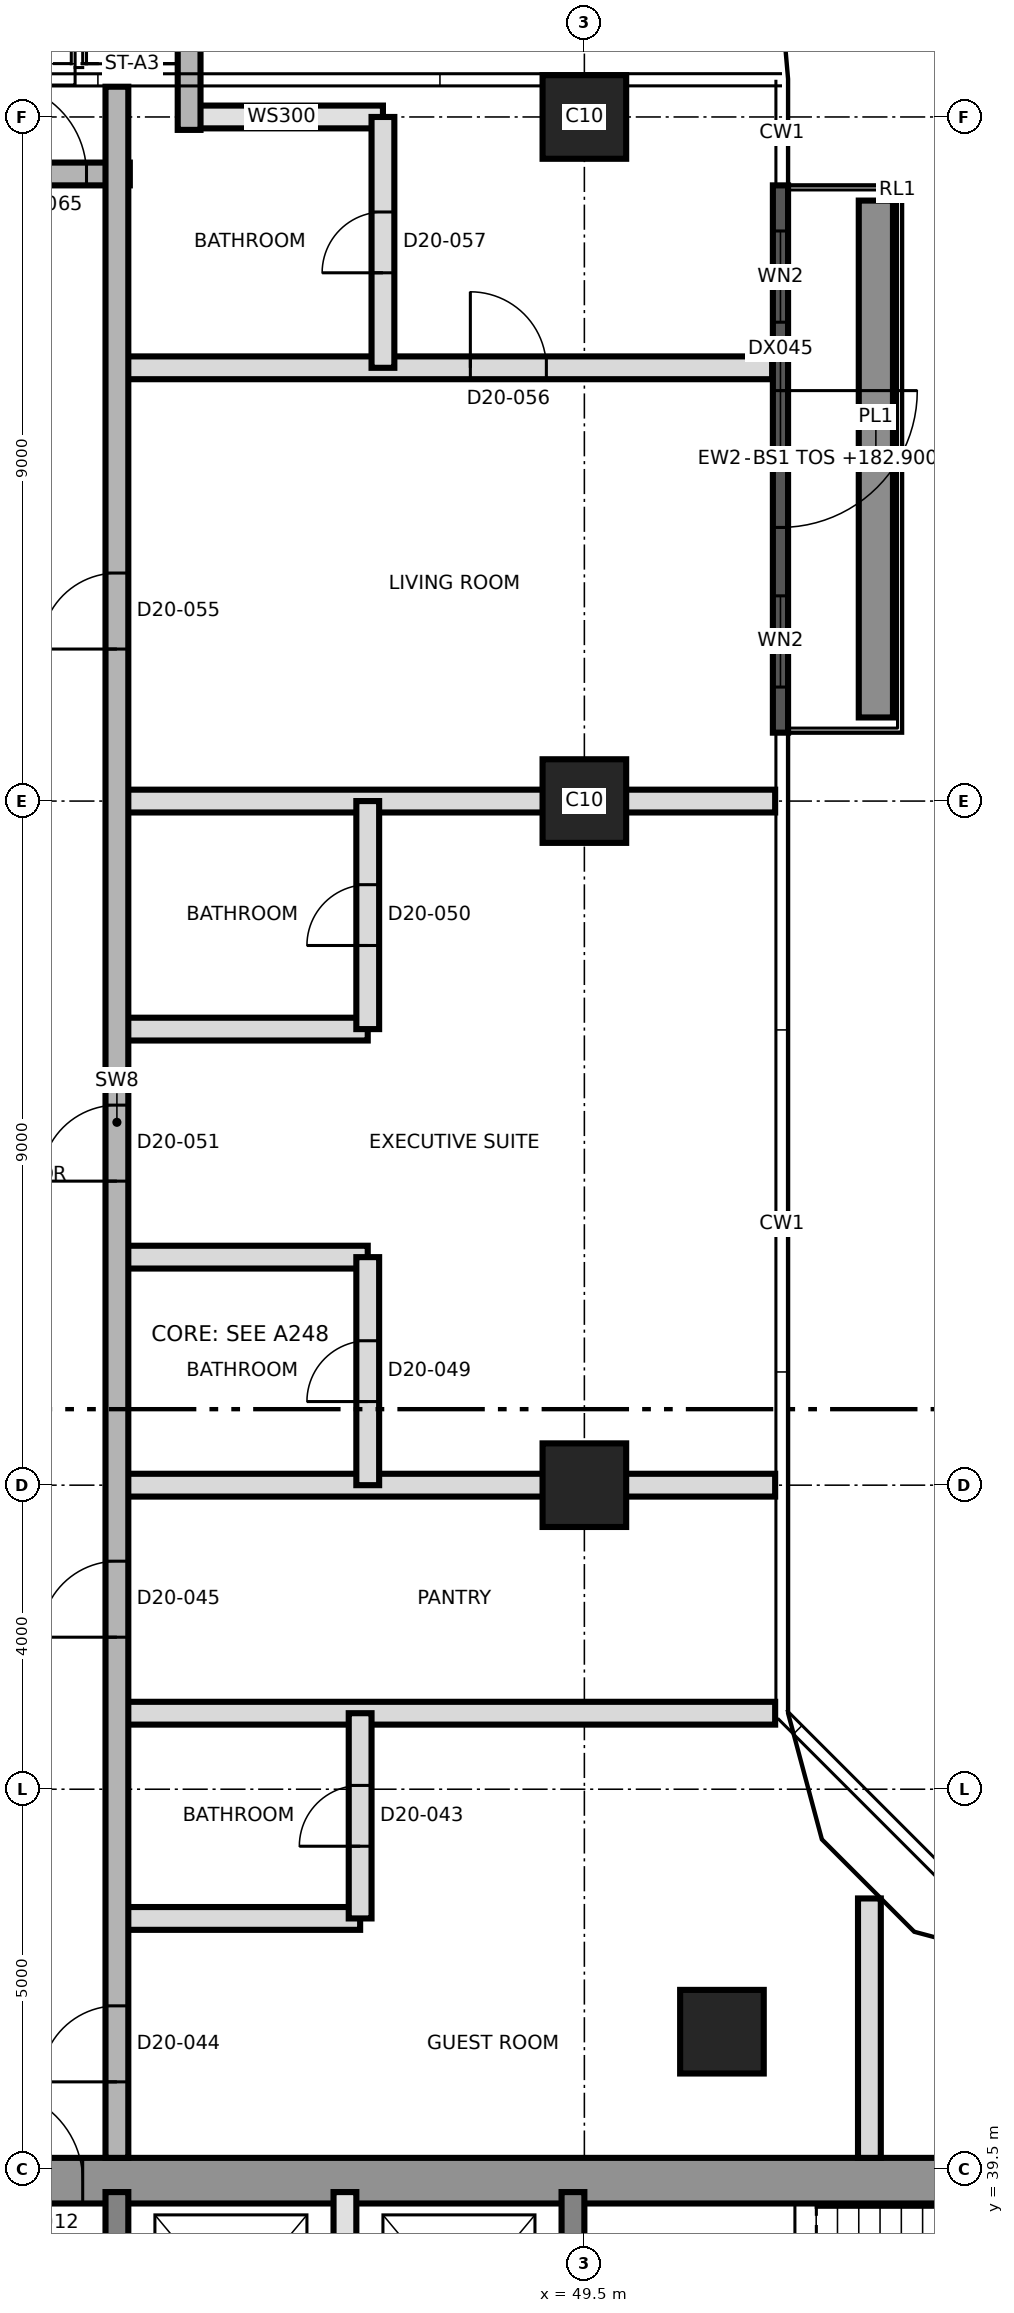
"""IFC4 building model, lengths in metres.
Left out: names, types, materials, properties, quantities, classifications, styles, units other than length and angle.
Written with IfcOpenShell. Run it as: python <this file> out.ifc"""

import sys

from ifc_helpers import new_model, si_unit, direction, frame, frame_2d, origin, origin_2d, place, context, subcontext, project, spatial, rectangle, extrude, element, fill, save


model = new_model("IFC4")
c1 = context("Model", 3, precision=1e-05, world=origin(), true_north=direction((0.0, 1.0)))
c2 = subcontext(c1, "Body", "Model", "MODEL_VIEW")
j1 = project(units=[si_unit("LENGTHUNIT", "METRE"), si_unit("PLANEANGLEUNIT", "RADIAN")], contexts=[c1])
p1 = place(None, origin())
s1 = spatial("IfcSite", under=j1, at=p1, CompositionType="ELEMENT")
p2 = place(p1, origin())
s2 = spatial("IfcBuilding", under=s1, at=p2, CompositionType="ELEMENT")
p3 = place(p2, frame((0.0, 0.0, 182.9)))
s3 = spatial("IfcBuildingStorey", under=s2, at=p3, CompositionType="ELEMENT", Elevation=182.9)
p4 = place(p3, frame((31.2, 39.35, 0.0), z_axis=(0.0, 0.0, 1.0), x_axis=(1.0, 0.0, 0.0)))
e1 = element("IfcWall", 1, at=p4, inside=s3, PredefinedType="SHEAR", context=c2, shape_type="SweptSolid", body=[
    extrude(rectangle(XDim=27.0, YDim=0.6, at=frame_2d((13.5, 0.0))), origin(), (0.0, 0.0, 1.0), 3.7),
])
p5 = place(p4, frame((10.5, 0.0, 0.0)))
e2 = element("IfcOpeningElement", 2, at=p5, cuts=e1, PredefinedType="OPENING", context=c2, shape_type="SweptSolid", body=[
    extrude(rectangle(XDim=1.2, YDim=2.1, at=frame_2d((0.6, 1.05))), frame((0.0, 0.31, 0.0), z_axis=(0.0, -1.0, 0.0), x_axis=(1.0, 0.0, 0.0)), (0.0, 0.0, 1.0), 0.62),
])
for number, where, z_axis, x_axis in (
    (3, (43.35, 33.5, 0.0), (0.0, 0.0, 1.0), (0.0, 1.0, 0.0)),
    (4, (49.35, 33.5, 0.0), (0.0, 0.0, 1.0), (0.0, 1.0, 0.0)),
):
    element("IfcWall", number, at=place(p3, frame(where, z_axis=z_axis, x_axis=x_axis)), inside=s3, PredefinedType="SHEAR", context=c2, shape_type="SweptSolid", body=[
        extrude(rectangle(XDim=5.7, YDim=0.3, at=frame_2d((2.85, 0.0))), origin(), (0.0, 0.0, 1.0), 3.7),
    ])
for number, where, z_axis, x_axis in (
    (5, (51.31, 41.31, 0.0), (0.0, 0.0, 1.0), (1.0, 0.0, 0.0)),
    (6, (49.5, 48.5, 0.0), (0.0, 0.0, 1.0), (1.0, 0.0, 0.0)),
    (7, (49.5, 57.5, 0.0), (0.0, 0.0, 1.0), (1.0, 0.0, 0.0)),
    (8, (49.5, 66.5, 0.0), (0.0, 0.0, 1.0), (1.0, 0.0, 0.0)),
):
    element("IfcColumn", number, at=place(p3, frame(where, z_axis=z_axis, x_axis=x_axis)), inside=s3, PredefinedType="COLUMN", context=c2, shape_type="SweptSolid", body=[
        extrude(rectangle(XDim=1.1, YDim=1.1, at=origin_2d()), origin(), (0.0, 0.0, 1.0), 3.7),
    ])
p6 = place(p3, frame((53.335, 62.0, 0.0), z_axis=(0.0, 0.0, 1.0), x_axis=(1.0, 0.0, 0.0)))
e9 = element("IfcWall", 9, at=p6, inside=s3, PredefinedType="SOLIDWALL", context=c2, shape_type="SweptSolid", body=[
    extrude(rectangle(XDim=0.45, YDim=6.8, at=origin_2d()), origin(), (0.0, 0.0, 1.0), 1.0),
])
p7 = place(p3, frame((52.08, 65.6, 0.0), z_axis=(0.0, 0.0, 1.0), x_axis=(0.0, -1.0, 0.0)))
e10 = element("IfcWall", 10, at=p7, inside=s3, PredefinedType="SOLIDWALL", context=c2, shape_type="SweptSolid", body=[
    extrude(rectangle(XDim=7.2, YDim=0.2, at=frame_2d((3.6, 0.0))), origin(), (0.0, 0.0, 1.0), 3.4),
])
p8 = place(p7, frame((2.7, 0.0, 0.0)))
e11 = element("IfcOpeningElement", 11, at=p8, cuts=e10, PredefinedType="OPENING", context=c2, shape_type="SweptSolid", body=[
    extrude(rectangle(XDim=1.8, YDim=2.4, at=frame_2d((0.9, 1.2))), frame((0.0, 0.11, 0.0), z_axis=(0.0, -1.0, 0.0), x_axis=(1.0, 0.0, 0.0)), (0.0, 0.0, 1.0), 0.22),
])
p9 = place(p7, frame((5.4, 0.0, 0.9)))
e12 = element("IfcOpeningElement", 12, at=p9, cuts=e10, PredefinedType="OPENING", context=c2, shape_type="SweptSolid", body=[
    extrude(rectangle(XDim=1.2, YDim=2.1, at=frame_2d((0.6, 1.05))), frame((0.0, 0.11, 0.0), z_axis=(0.0, -1.0, 0.0), x_axis=(1.0, 0.0, 0.0)), (0.0, 0.0, 1.0), 0.22),
])
p10 = place(p7, frame((0.6, 0.0, 0.9)))
e13 = element("IfcOpeningElement", 13, at=p10, cuts=e10, PredefinedType="OPENING", context=c2, shape_type="SweptSolid", body=[
    extrude(rectangle(XDim=1.2, YDim=2.1, at=frame_2d((0.6, 1.05))), frame((0.0, 0.11, 0.0), z_axis=(0.0, -1.0, 0.0), x_axis=(1.0, 0.0, 0.0)), (0.0, 0.0, 1.0), 0.22),
])
p11 = place(p3, frame((46.35, 36.2, 0.0), z_axis=(0.0, 0.0, 1.0), x_axis=(0.0, 1.0, 0.0)))
e14 = element("IfcWall", 14, at=p11, inside=s3, PredefinedType="SOLIDWALL", context=c2, shape_type="SweptSolid", body=[
    extrude(rectangle(XDim=3.0, YDim=0.3, at=frame_2d((1.5, 0.0))), origin(), (0.0, 0.0, 1.0), 3.4),
])
p12 = place(p3, frame((43.35, 42.8, 0.0), z_axis=(0.0, 0.0, 1.0), x_axis=(1.0, 0.0, 0.0)))
e15 = element("IfcWall", 15, at=p12, inside=s3, PredefinedType="PARTITIONING", context=c2, shape_type="SweptSolid", body=[
    extrude(rectangle(XDim=3.2, YDim=0.3, at=frame_2d((1.6, 0.0))), origin(), (0.0, 0.0, 1.0), 3.4),
])
for number, where, z_axis, x_axis in (
    (16, (43.35, 45.5, 0.0), (0.0, 0.0, 1.0), (1.0, 0.0, 0.0)),
    (17, (43.35, 48.5, 0.0), (0.0, 0.0, 1.0), (1.0, 0.0, 0.0)),
):
    element("IfcWall", number, at=place(p3, frame(where, z_axis=z_axis, x_axis=x_axis)), inside=s3, PredefinedType="PARTITIONING", context=c2, shape_type="SweptSolid", body=[
        extrude(rectangle(XDim=8.66, YDim=0.3, at=frame_2d((4.33, 0.0))), origin(), (0.0, 0.0, 1.0), 3.4),
    ])
for number, where, z_axis, x_axis in (
    (18, (43.35, 51.5, 0.0), (0.0, 0.0, 1.0), (1.0, 0.0, 0.0)),
    (19, (43.35, 54.5, 0.0), (0.0, 0.0, 1.0), (1.0, 0.0, 0.0)),
):
    element("IfcWall", number, at=place(p3, frame(where, z_axis=z_axis, x_axis=x_axis)), inside=s3, PredefinedType="PARTITIONING", context=c2, shape_type="SweptSolid", body=[
        extrude(rectangle(XDim=3.3, YDim=0.3, at=frame_2d((1.65, 0.0))), origin(), (0.0, 0.0, 1.0), 3.4),
    ])
p13 = place(p3, frame((43.35, 57.5, 0.0), z_axis=(0.0, 0.0, 1.0), x_axis=(1.0, 0.0, 0.0)))
e20 = element("IfcWall", 20, at=p13, inside=s3, PredefinedType="PARTITIONING", context=c2, shape_type="SweptSolid", body=[
    extrude(rectangle(XDim=8.66, YDim=0.3, at=frame_2d((4.33, 0.0))), origin(), (0.0, 0.0, 1.0), 3.4),
])
p14 = place(p3, frame((43.35, 63.2, 0.0), z_axis=(0.0, 0.0, 1.0), x_axis=(1.0, 0.0, 0.0)))
e21 = element("IfcWall", 21, at=p14, inside=s3, PredefinedType="PARTITIONING", context=c2, shape_type="SweptSolid", body=[
    extrude(rectangle(XDim=8.62, YDim=0.3, at=frame_2d((4.31, 0.0))), origin(), (0.0, 0.0, 1.0), 3.4),
])
p15 = place(p14, frame((4.65, 0.0, 0.0)))
e22 = element("IfcOpeningElement", 22, at=p15, cuts=e21, PredefinedType="OPENING", context=c2, shape_type="SweptSolid", body=[
    extrude(rectangle(XDim=1.0, YDim=2.1, at=frame_2d((0.5, 1.05))), frame((0.0, 0.16, 0.0), z_axis=(0.0, -1.0, 0.0), x_axis=(1.0, 0.0, 0.0)), (0.0, 0.0, 1.0), 0.32),
])
p16 = place(p3, frame((40.65, 65.75, 0.0), z_axis=(0.0, 0.0, 1.0), x_axis=(1.0, 0.0, 0.0)))
e23 = element("IfcWall", 23, at=p16, inside=s3, PredefinedType="SHEAR", context=c2, shape_type="SweptSolid", body=[
    extrude(rectangle(XDim=2.87, YDim=0.3, at=frame_2d((1.435, 0.0))), origin(), (0.0, 0.0, 1.0), 3.4),
])
p17 = place(p16, frame((1.1, 0.0, 0.0)))
e24 = element("IfcOpeningElement", 24, at=p17, cuts=e23, PredefinedType="OPENING", context=c2, shape_type="SweptSolid", body=[
    extrude(rectangle(XDim=1.2, YDim=2.1, at=frame_2d((0.6, 1.05))), frame((0.0, 0.16, 0.0), z_axis=(0.0, -1.0, 0.0), x_axis=(1.0, 0.0, 0.0)), (0.0, 0.0, 1.0), 0.32),
])
p18 = place(p3, frame((44.18, 66.5, 0.0), z_axis=(0.0, 0.0, 1.0), x_axis=(1.0, 0.0, 0.0)))
e25 = element("IfcWall", 25, at=p18, inside=s3, PredefinedType="SOLIDWALL", context=c2, shape_type="SweptSolid", body=[
    extrude(rectangle(XDim=2.67, YDim=0.3, at=frame_2d((1.335, 0.0))), origin(), (0.0, 0.0, 1.0), 3.4),
])
p19 = place(p3, frame((43.35, 39.65, 0.0), z_axis=(0.0, 0.0, 1.0), x_axis=(0.0, 1.0, 0.0)))
e26 = element("IfcWall", 26, at=p19, inside=s3, PredefinedType="SHEAR", context=c2, shape_type="SweptSolid", body=[
    extrude(rectangle(XDim=27.248, YDim=0.3, at=frame_2d((13.624, 0.0))), origin(), (0.0, 0.0, 1.0), 3.4),
])
p20 = place(p19, frame((1.0, 0.0, 0.0)))
e27 = element("IfcOpeningElement", 27, at=p20, cuts=e26, PredefinedType="OPENING", context=c2, shape_type="SweptSolid", body=[
    extrude(rectangle(XDim=1.0, YDim=2.1, at=frame_2d((0.5, 1.05))), frame((0.0, 0.16, 0.0), z_axis=(0.0, -1.0, 0.0), x_axis=(1.0, 0.0, 0.0)), (0.0, 0.0, 1.0), 0.32),
])
p21 = place(p19, frame((6.85, 0.0, 0.0)))
e28 = element("IfcOpeningElement", 28, at=p21, cuts=e26, PredefinedType="OPENING", context=c2, shape_type="SweptSolid", body=[
    extrude(rectangle(XDim=1.0, YDim=2.1, at=frame_2d((0.5, 1.05))), frame((0.0, 0.16, 0.0), z_axis=(0.0, -1.0, 0.0), x_axis=(1.0, 0.0, 0.0)), (0.0, 0.0, 1.0), 0.32),
])
p22 = place(p19, frame((12.85, 0.0, 0.0)))
e29 = element("IfcOpeningElement", 29, at=p22, cuts=e26, PredefinedType="OPENING", context=c2, shape_type="SweptSolid", body=[
    extrude(rectangle(XDim=1.0, YDim=2.1, at=frame_2d((0.5, 1.05))), frame((0.0, 0.16, 0.0), z_axis=(0.0, -1.0, 0.0), x_axis=(1.0, 0.0, 0.0)), (0.0, 0.0, 1.0), 0.32),
])
p23 = place(p19, frame((19.85, 0.0, 0.0)))
e30 = element("IfcOpeningElement", 30, at=p23, cuts=e26, PredefinedType="OPENING", context=c2, shape_type="SweptSolid", body=[
    extrude(rectangle(XDim=1.0, YDim=2.1, at=frame_2d((0.5, 1.05))), frame((0.0, 0.16, 0.0), z_axis=(0.0, -1.0, 0.0), x_axis=(1.0, 0.0, 0.0)), (0.0, 0.0, 1.0), 0.32),
])
p24 = place(p3, frame((44.3, 66.33, 0.0), z_axis=(0.0, 0.0, 1.0), x_axis=(0.0, 1.0, 0.0)))
e31 = element("IfcWall", 31, at=p24, inside=s3, PredefinedType="SHEAR", context=c2, shape_type="SweptSolid", body=[
    extrude(rectangle(XDim=8.27, YDim=0.3, at=frame_2d((4.135, 0.0))), origin(), (0.0, 0.0, 1.0), 3.4),
])
p25 = place(p3, frame((46.55, 42.8, 0.0), z_axis=(0.0, 0.0, 1.0), x_axis=(0.0, 1.0, 0.0)))
e32 = element("IfcWall", 32, at=p25, inside=s3, PredefinedType="PARTITIONING", context=c2, shape_type="SweptSolid", body=[
    extrude(rectangle(XDim=2.7, YDim=0.3, at=frame_2d((1.35, 0.0))), origin(), (0.0, 0.0, 1.0), 3.4),
])
p26 = place(p25, frame((0.95, 0.0, 0.0)))
e33 = element("IfcOpeningElement", 33, at=p26, cuts=e32, PredefinedType="OPENING", context=c2, shape_type="SweptSolid", body=[
    extrude(rectangle(XDim=0.8, YDim=2.1, at=frame_2d((0.4, 1.05))), frame((0.0, 0.16, 0.0), z_axis=(0.0, -1.0, 0.0), x_axis=(1.0, 0.0, 0.0)), (0.0, 0.0, 1.0), 0.32),
])
p27 = place(p3, frame((46.65, 48.5, 0.0), z_axis=(0.0, 0.0, 1.0), x_axis=(0.0, 1.0, 0.0)))
e34 = element("IfcWall", 34, at=p27, inside=s3, PredefinedType="PARTITIONING", context=c2, shape_type="SweptSolid", body=[
    extrude(rectangle(XDim=3.0, YDim=0.3, at=frame_2d((1.5, 0.0))), origin(), (0.0, 0.0, 1.0), 3.4),
])
p28 = place(p27, frame((1.1, 0.0, 0.0)))
e35 = element("IfcOpeningElement", 35, at=p28, cuts=e34, PredefinedType="OPENING", context=c2, shape_type="SweptSolid", body=[
    extrude(rectangle(XDim=0.8, YDim=2.1, at=frame_2d((0.4, 1.05))), frame((0.0, 0.16, 0.0), z_axis=(0.0, -1.0, 0.0), x_axis=(1.0, 0.0, 0.0)), (0.0, 0.0, 1.0), 0.32),
])
p29 = place(p3, frame((46.65, 54.5, 0.0), z_axis=(0.0, 0.0, 1.0), x_axis=(0.0, 1.0, 0.0)))
e36 = element("IfcWall", 36, at=p29, inside=s3, PredefinedType="PARTITIONING", context=c2, shape_type="SweptSolid", body=[
    extrude(rectangle(XDim=3.0, YDim=0.3, at=frame_2d((1.5, 0.0))), origin(), (0.0, 0.0, 1.0), 3.4),
])
p30 = place(p29, frame((1.1, 0.0, 0.0)))
e37 = element("IfcOpeningElement", 37, at=p30, cuts=e36, PredefinedType="OPENING", context=c2, shape_type="SweptSolid", body=[
    extrude(rectangle(XDim=0.8, YDim=2.1, at=frame_2d((0.4, 1.05))), frame((0.0, 0.16, 0.0), z_axis=(0.0, -1.0, 0.0), x_axis=(1.0, 0.0, 0.0)), (0.0, 0.0, 1.0), 0.32),
])
p31 = place(p3, frame((46.85, 63.2, 0.0), z_axis=(0.0, 0.0, 1.0), x_axis=(0.0, 1.0, 0.0)))
e38 = element("IfcWall", 38, at=p31, inside=s3, PredefinedType="PARTITIONING", context=c2, shape_type="SweptSolid", body=[
    extrude(rectangle(XDim=3.3, YDim=0.3, at=frame_2d((1.65, 0.0))), origin(), (0.0, 0.0, 1.0), 3.4),
])
p32 = place(p31, frame((1.25, 0.0, 0.0)))
e39 = element("IfcOpeningElement", 39, at=p32, cuts=e38, PredefinedType="OPENING", context=c2, shape_type="SweptSolid", body=[
    extrude(rectangle(XDim=0.8, YDim=2.1, at=frame_2d((0.4, 1.05))), frame((0.0, 0.16, 0.0), z_axis=(0.0, -1.0, 0.0), x_axis=(1.0, 0.0, 0.0)), (0.0, 0.0, 1.0), 0.32),
])
p33 = place(p3, frame((53.25, 39.65, 0.0), z_axis=(0.0, 0.0, 1.0), x_axis=(0.0, 1.0, 0.0)))
e40 = element("IfcWall", 40, at=p33, inside=s3, PredefinedType="PARTITIONING", context=c2, shape_type="SweptSolid", body=[
    extrude(rectangle(XDim=3.413, YDim=0.3, at=frame_2d((1.707, 0.0))), origin(), (0.0, 0.0, 1.0), 3.4),
])
p34 = place(p8, origin())
e41 = element("IfcDoor", 41, at=p34, inside=s3, OperationType="SINGLE_SWING_LEFT", PredefinedType="DOOR", context=c2, shape_type="SweptSolid", body=[
    extrude(rectangle(XDim=1.8, YDim=2.4, at=frame_2d((0.9, 1.2))), frame((0.0, 0.025, 0.0), z_axis=(0.0, -1.0, 0.0), x_axis=(1.0, 0.0, 0.0)), (0.0, 0.0, 1.0), 0.05),
])
fill(e11, e41)
p35 = place(p9, origin())
e42 = element("IfcWindow", 42, at=p35, inside=s3, PartitioningType="SINGLE_PANEL", PredefinedType="WINDOW", context=c2, shape_type="SweptSolid", body=[
    extrude(rectangle(XDim=1.2, YDim=2.1, at=frame_2d((0.6, 1.05))), frame((0.0, 0.03, 0.0), z_axis=(0.0, -1.0, 0.0), x_axis=(1.0, 0.0, 0.0)), (0.0, 0.0, 1.0), 0.06),
])
fill(e12, e42)
p36 = place(p10, origin())
e43 = element("IfcWindow", 43, at=p36, inside=s3, PartitioningType="SINGLE_PANEL", PredefinedType="WINDOW", context=c2, shape_type="SweptSolid", body=[
    extrude(rectangle(XDim=1.2, YDim=2.1, at=frame_2d((0.6, 1.05))), frame((0.0, 0.03, 0.0), z_axis=(0.0, -1.0, 0.0), x_axis=(1.0, 0.0, 0.0)), (0.0, 0.0, 1.0), 0.06),
])
fill(e13, e43)
p37 = place(p5, origin())
e44 = element("IfcDoor", 44, at=p37, inside=s3, OperationType="SINGLE_SWING_RIGHT", PredefinedType="DOOR", context=c2, shape_type="SweptSolid", body=[
    extrude(rectangle(XDim=1.2, YDim=2.1, at=frame_2d((0.6, 1.05))), frame((0.0, 0.025, 0.0), z_axis=(0.0, -1.0, 0.0), x_axis=(1.0, 0.0, 0.0)), (0.0, 0.0, 1.0), 0.05),
])
fill(e2, e44)
p38 = place(p26, origin())
e45 = element("IfcDoor", 45, at=p38, inside=s3, OperationType="SINGLE_SWING_RIGHT", PredefinedType="DOOR", context=c2, shape_type="SweptSolid", body=[
    extrude(rectangle(XDim=0.8, YDim=2.1, at=frame_2d((0.4, 1.05))), frame((0.0, 0.025, 0.0), z_axis=(0.0, -1.0, 0.0), x_axis=(1.0, 0.0, 0.0)), (0.0, 0.0, 1.0), 0.05),
])
fill(e33, e45)
p39 = place(p20, origin())
e46 = element("IfcDoor", 46, at=p39, inside=s3, OperationType="SINGLE_SWING_LEFT", PredefinedType="DOOR", context=c2, shape_type="SweptSolid", body=[
    extrude(rectangle(XDim=1.0, YDim=2.1, at=frame_2d((0.5, 1.05))), frame((0.0, 0.025, 0.0), z_axis=(0.0, -1.0, 0.0), x_axis=(1.0, 0.0, 0.0)), (0.0, 0.0, 1.0), 0.05),
])
fill(e27, e46)
p40 = place(p21, origin())
e47 = element("IfcDoor", 47, at=p40, inside=s3, OperationType="SINGLE_SWING_LEFT", PredefinedType="DOOR", context=c2, shape_type="SweptSolid", body=[
    extrude(rectangle(XDim=1.0, YDim=2.1, at=frame_2d((0.5, 1.05))), frame((0.0, 0.025, 0.0), z_axis=(0.0, -1.0, 0.0), x_axis=(1.0, 0.0, 0.0)), (0.0, 0.0, 1.0), 0.05),
])
fill(e28, e47)
p41 = place(p28, origin())
e48 = element("IfcDoor", 48, at=p41, inside=s3, OperationType="SINGLE_SWING_RIGHT", PredefinedType="DOOR", context=c2, shape_type="SweptSolid", body=[
    extrude(rectangle(XDim=0.8, YDim=2.1, at=frame_2d((0.4, 1.05))), frame((0.0, 0.025, 0.0), z_axis=(0.0, -1.0, 0.0), x_axis=(1.0, 0.0, 0.0)), (0.0, 0.0, 1.0), 0.05),
])
fill(e35, e48)
p42 = place(p30, origin())
e49 = element("IfcDoor", 49, at=p42, inside=s3, OperationType="SINGLE_SWING_LEFT", PredefinedType="DOOR", context=c2, shape_type="SweptSolid", body=[
    extrude(rectangle(XDim=0.8, YDim=2.1, at=frame_2d((0.4, 1.05))), frame((0.0, 0.025, 0.0), z_axis=(0.0, -1.0, 0.0), x_axis=(1.0, 0.0, 0.0)), (0.0, 0.0, 1.0), 0.05),
])
fill(e37, e49)
p43 = place(p22, origin())
e50 = element("IfcDoor", 50, at=p43, inside=s3, OperationType="SINGLE_SWING_LEFT", PredefinedType="DOOR", context=c2, shape_type="SweptSolid", body=[
    extrude(rectangle(XDim=1.0, YDim=2.1, at=frame_2d((0.5, 1.05))), frame((0.0, 0.025, 0.0), z_axis=(0.0, -1.0, 0.0), x_axis=(1.0, 0.0, 0.0)), (0.0, 0.0, 1.0), 0.05),
])
fill(e29, e50)
p44 = place(p23, origin())
e51 = element("IfcDoor", 51, at=p44, inside=s3, OperationType="SINGLE_SWING_LEFT", PredefinedType="DOOR", context=c2, shape_type="SweptSolid", body=[
    extrude(rectangle(XDim=1.0, YDim=2.1, at=frame_2d((0.5, 1.05))), frame((0.0, 0.025, 0.0), z_axis=(0.0, -1.0, 0.0), x_axis=(1.0, 0.0, 0.0)), (0.0, 0.0, 1.0), 0.05),
])
fill(e30, e51)
p45 = place(p15, origin())
e52 = element("IfcDoor", 52, at=p45, inside=s3, OperationType="SINGLE_SWING_RIGHT", PredefinedType="DOOR", context=c2, shape_type="SweptSolid", body=[
    extrude(rectangle(XDim=1.0, YDim=2.1, at=frame_2d((0.5, 1.05))), frame((0.0, 0.025, 0.0), z_axis=(0.0, -1.0, 0.0), x_axis=(1.0, 0.0, 0.0)), (0.0, 0.0, 1.0), 0.05),
])
fill(e22, e52)
p46 = place(p32, origin())
e53 = element("IfcDoor", 53, at=p46, inside=s3, OperationType="SINGLE_SWING_LEFT", PredefinedType="DOOR", context=c2, shape_type="SweptSolid", body=[
    extrude(rectangle(XDim=0.8, YDim=2.1, at=frame_2d((0.4, 1.05))), frame((0.0, 0.025, 0.0), z_axis=(0.0, -1.0, 0.0), x_axis=(1.0, 0.0, 0.0)), (0.0, 0.0, 1.0), 0.05),
])
fill(e39, e53)
p47 = place(p17, origin())
e54 = element("IfcDoor", 54, at=p47, inside=s3, OperationType="SINGLE_SWING_RIGHT", PredefinedType="DOOR", context=c2, shape_type="SweptSolid", body=[
    extrude(rectangle(XDim=1.2, YDim=2.1, at=frame_2d((0.6, 1.05))), frame((0.0, 0.025, 0.0), z_axis=(0.0, -1.0, 0.0), x_axis=(1.0, 0.0, 0.0)), (0.0, 0.0, 1.0), 0.05),
])
fill(e24, e54)
save(model, sys.argv[1])
